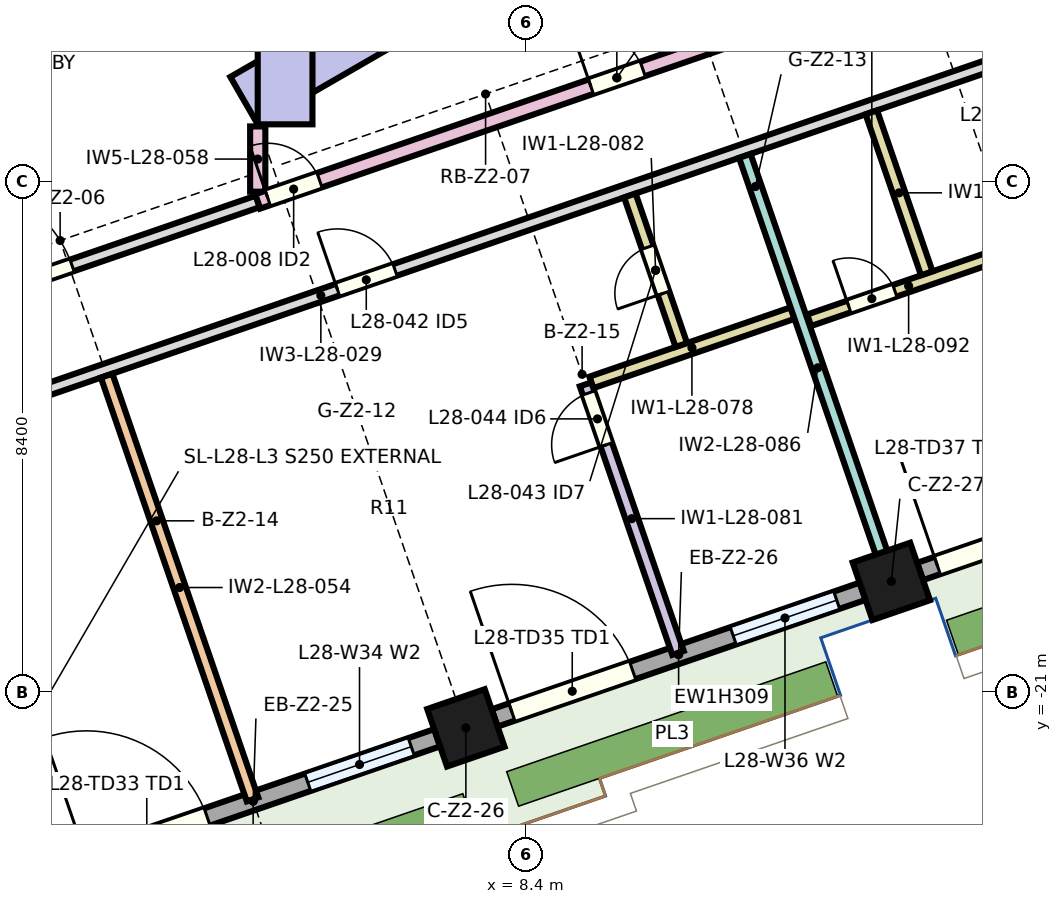
"""IFC4 building model, lengths in metres.
Left out: names, types, materials, properties, quantities, classifications, styles, units other than length and angle.
Written with IfcOpenShell. Run it as: python <this file> out.ifc"""

import sys

from ifc_helpers import new_model, si_unit, direction, frame, frame_2d, origin, origin_2d, place, context, subcontext, project, spatial, rectangle, extrude, element, fill, save


model = new_model("IFC4")
c1 = context("Model", 3, precision=1e-05, world=origin(), true_north=direction((0.0, 1.0)))
c2 = subcontext(c1, "Body", "Model", "MODEL_VIEW")
j1 = project(units=[si_unit("LENGTHUNIT", "METRE"), si_unit("PLANEANGLEUNIT", "RADIAN")], contexts=[c1])
p1 = place(None, origin())
s1 = spatial("IfcSite", under=j1, at=p1, CompositionType="ELEMENT")
p2 = place(p1, origin())
s2 = spatial("IfcBuilding", under=s1, at=p2, CompositionType="ELEMENT")
p3 = place(p2, frame((0.0, 0.0, 134.5)))
s3 = spatial("IfcBuildingStorey", under=s2, at=p3, CompositionType="ELEMENT", Elevation=134.5)
for number, where, z_axis, x_axis in (
    (1, (7.423, -21.558, 0.0), (0.0, 0.0, 1.0), (0.946, 0.326, 0.0)),
    (2, (14.42, -19.149, 0.0), (0.0, 0.0, 1.0), (0.946, 0.326, 0.0)),
):
    element("IfcColumn", number, at=place(p3, frame(where, z_axis=z_axis, x_axis=x_axis)), inside=s3, PredefinedType="COLUMN", context=c2, shape_type="SweptSolid", body=[
        extrude(rectangle(XDim=1.0, YDim=1.0, at=origin_2d()), origin(), (0.0, 0.0, 1.0), 3.55),
    ])
p4 = place(p3, frame((8.614, -8.449, 0.0), z_axis=(0.0, 0.0, 1.0), x_axis=(-0.866026961591, -0.49999730179, 0.0)))
e3 = element("IfcWall", 3, at=p4, inside=s3, PredefinedType="SHEAR", context=c2, shape_type="SweptSolid", body=[
    extrude(rectangle(XDim=5.587, YDim=0.9, at=frame_2d((2.794, 0.0))), origin(), (0.0, 0.0, 1.0), 3.8),
])
p5 = place(p3, frame((4.45, -11.633, 0.0), z_axis=(0.0, 0.0, 1.0), x_axis=(0.0, 1.0, 0.0)))
e4 = element("IfcWall", 4, at=p5, inside=s3, PredefinedType="SHEAR", context=c2, shape_type="SweptSolid", body=[
    extrude(rectangle(XDim=23.265, YDim=0.9, at=frame_2d((11.633, 0.0))), origin(), (0.0, 0.0, 1.0), 3.8),
])
p6 = place(p5, frame((7.558, 0.0, 0.0)))
e5 = element("IfcOpeningElement", 5, at=p6, cuts=e4, PredefinedType="OPENING", context=c2, shape_type="SweptSolid", body=[
    extrude(rectangle(XDim=1.1, YDim=2.1, at=frame_2d((0.55, 1.05))), frame((0.0, 0.46, 0.0), z_axis=(0.0, -1.0, 0.0), x_axis=(1.0, 0.0, 0.0)), (0.0, 0.0, 1.0), 0.92),
])
p7 = place(p5, frame((9.907, 0.0, 0.0)))
e6 = element("IfcOpeningElement", 6, at=p7, cuts=e4, PredefinedType="OPENING", context=c2, shape_type="SweptSolid", body=[
    extrude(rectangle(XDim=1.1, YDim=2.1, at=frame_2d((0.55, 1.05))), frame((0.0, 0.46, 0.0), z_axis=(0.0, -1.0, 0.0), x_axis=(1.0, 0.0, 0.0)), (0.0, 0.0, 1.0), 0.92),
])
p8 = place(p5, frame((12.258, 0.0, 0.0)))
e7 = element("IfcOpeningElement", 7, at=p8, cuts=e4, PredefinedType="OPENING", context=c2, shape_type="SweptSolid", body=[
    extrude(rectangle(XDim=1.1, YDim=2.1, at=frame_2d((0.55, 1.05))), frame((0.0, 0.46, 0.0), z_axis=(0.0, -1.0, 0.0), x_axis=(1.0, 0.0, 0.0)), (0.0, 0.0, 1.0), 0.92),
])
p9 = place(p5, frame((14.607, 0.0, 0.0)))
e8 = element("IfcOpeningElement", 8, at=p9, cuts=e4, PredefinedType="OPENING", context=c2, shape_type="SweptSolid", body=[
    extrude(rectangle(XDim=1.1, YDim=2.1, at=frame_2d((0.55, 1.05))), frame((0.0, 0.46, 0.0), z_axis=(0.0, -1.0, 0.0), x_axis=(1.0, 0.0, 0.0)), (0.0, 0.0, 1.0), 0.92),
])
p10 = place(p5, frame((5.208, 0.0, 0.0)))
e9 = element("IfcOpeningElement", 9, at=p10, cuts=e4, PredefinedType="OPENING", context=c2, shape_type="SweptSolid", body=[
    extrude(rectangle(XDim=1.1, YDim=2.1, at=frame_2d((0.55, 1.05))), frame((0.0, 0.46, 0.0), z_axis=(0.0, -1.0, 0.0), x_axis=(1.0, 0.0, 0.0)), (0.0, 0.0, 1.0), 0.92),
])
p11 = place(p5, frame((17.008, 0.0, 0.0)))
e10 = element("IfcOpeningElement", 10, at=p11, cuts=e4, PredefinedType="OPENING", context=c2, shape_type="SweptSolid", body=[
    extrude(rectangle(XDim=1.0, YDim=2.1, at=frame_2d((0.5, 1.05))), frame((0.0, 0.46, 0.0), z_axis=(0.0, -1.0, 0.0), x_axis=(1.0, 0.0, 0.0)), (0.0, 0.0, 1.0), 0.92),
])
p12 = place(p3, frame((0.899, -23.804, 0.0), z_axis=(0.0, 0.0, 1.0), x_axis=(0.945524496524, 0.325550958337, 0.0)))
e11 = element("IfcWall", 11, at=p12, inside=s3, PredefinedType="SOLIDWALL", context=c2, shape_type="SweptSolid", body=[
    extrude(rectangle(XDim=6.4, YDim=0.3, at=frame_2d((3.2, 0.0))), origin(), (0.0, 0.0, 1.0), 3.09),
])
p13 = place(p12, frame((0.3, 0.0, 0.0)))
e12 = element("IfcOpeningElement", 12, at=p13, cuts=e11, PredefinedType="OPENING", context=c2, shape_type="SweptSolid", body=[
    extrude(rectangle(XDim=2.1, YDim=2.4, at=frame_2d((1.05, 1.2))), frame((0.0, 0.16, 0.0), z_axis=(0.0, -1.0, 0.0), x_axis=(1.0, 0.0, 0.0)), (0.0, 0.0, 1.0), 0.32),
])
p14 = place(p12, frame((4.15, 0.0, 0.9)))
e13 = element("IfcOpeningElement", 13, at=p14, cuts=e11, PredefinedType="OPENING", context=c2, shape_type="SweptSolid", body=[
    extrude(rectangle(XDim=1.8, YDim=1.5, at=frame_2d((0.9, 0.75))), frame((0.0, 0.16, 0.0), z_axis=(0.0, -1.0, 0.0), x_axis=(1.0, 0.0, 0.0)), (0.0, 0.0, 1.0), 0.32),
])
p15 = place(p3, frame((7.896, -21.395, 0.0), z_axis=(0.0, 0.0, 1.0), x_axis=(0.945524496524, 0.325550958337, 0.0)))
e14 = element("IfcWall", 14, at=p15, inside=s3, PredefinedType="SOLIDWALL", context=c2, shape_type="SweptSolid", body=[
    extrude(rectangle(XDim=6.4, YDim=0.3, at=frame_2d((3.2, 0.0))), origin(), (0.0, 0.0, 1.0), 3.09),
])
p16 = place(p15, frame((0.3, 0.0, 0.0)))
e15 = element("IfcOpeningElement", 15, at=p16, cuts=e14, PredefinedType="OPENING", context=c2, shape_type="SweptSolid", body=[
    extrude(rectangle(XDim=2.1, YDim=2.4, at=frame_2d((1.05, 1.2))), frame((0.0, 0.16, 0.0), z_axis=(0.0, -1.0, 0.0), x_axis=(1.0, 0.0, 0.0)), (0.0, 0.0, 1.0), 0.32),
])
p17 = place(p15, frame((4.15, 0.0, 0.9)))
e16 = element("IfcOpeningElement", 16, at=p17, cuts=e14, PredefinedType="OPENING", context=c2, shape_type="SweptSolid", body=[
    extrude(rectangle(XDim=1.8, YDim=1.5, at=frame_2d((0.9, 0.75))), frame((0.0, 0.16, 0.0), z_axis=(0.0, -1.0, 0.0), x_axis=(1.0, 0.0, 0.0)), (0.0, 0.0, 1.0), 0.32),
])
p18 = place(p3, frame((14.893, -18.986, 0.0), z_axis=(0.0, 0.0, 1.0), x_axis=(0.945512753621, 0.325585062219, 0.0)))
e17 = element("IfcWall", 17, at=p18, inside=s3, PredefinedType="SOLIDWALL", context=c2, shape_type="SweptSolid", body=[
    extrude(rectangle(XDim=6.4, YDim=0.3, at=frame_2d((3.2, 0.0))), origin(), (0.0, 0.0, 1.0), 3.09),
])
p19 = place(p18, frame((0.3, 0.0, 0.0)))
e18 = element("IfcOpeningElement", 18, at=p19, cuts=e17, PredefinedType="OPENING", context=c2, shape_type="SweptSolid", body=[
    extrude(rectangle(XDim=2.1, YDim=2.4, at=frame_2d((1.05, 1.2))), frame((0.0, 0.16, 0.0), z_axis=(0.0, -1.0, 0.0), x_axis=(1.0, 0.0, 0.0)), (0.0, 0.0, 1.0), 0.32),
])
p20 = place(p18, frame((4.15, 0.0, 0.9)))
e19 = element("IfcOpeningElement", 19, at=p20, cuts=e17, PredefinedType="OPENING", context=c2, shape_type="SweptSolid", body=[
    extrude(rectangle(XDim=1.8, YDim=1.5, at=frame_2d((0.9, 0.75))), frame((0.0, 0.16, 0.0), z_axis=(0.0, -1.0, 0.0), x_axis=(1.0, 0.0, 0.0)), (0.0, 0.0, 1.0), 0.32),
])
p21 = place(p3, frame((-12.586, -20.515, 0.0), z_axis=(0.0, 0.0, 1.0), x_axis=(0.945519939336, 0.325564193852, 0.0)))
e20 = element("IfcWall", 20, at=p21, inside=s3, PredefinedType="PARTITIONING", context=c2, shape_type="SweptSolid", body=[
    extrude(rectangle(XDim=37.28, YDim=0.2, at=frame_2d((18.64, 0.0))), origin(), (0.0, 0.0, 1.0), 3.55),
])
p22 = place(p21, frame((9.83, 0.0, 0.0)))
e21 = element("IfcOpeningElement", 21, at=p22, cuts=e20, PredefinedType="OPENING", context=c2, shape_type="SweptSolid", body=[
    extrude(rectangle(XDim=1.0, YDim=2.1, at=frame_2d((0.5, 1.05))), frame((0.0, 0.11, 0.0), z_axis=(0.0, -1.0, 0.0), x_axis=(1.0, 0.0, 0.0)), (0.0, 0.0, 1.0), 0.22),
])
p23 = place(p21, frame((18.93, 0.0, 0.0)))
e22 = element("IfcOpeningElement", 22, at=p23, cuts=e20, PredefinedType="OPENING", context=c2, shape_type="SweptSolid", body=[
    extrude(rectangle(XDim=1.0, YDim=2.1, at=frame_2d((0.5, 1.05))), frame((0.0, 0.11, 0.0), z_axis=(0.0, -1.0, 0.0), x_axis=(1.0, 0.0, 0.0)), (0.0, 0.0, 1.0), 0.22),
])
p24 = place(p21, frame((30.28, 0.0, 0.0)))
e23 = element("IfcOpeningElement", 23, at=p24, cuts=e20, PredefinedType="OPENING", context=c2, shape_type="SweptSolid", body=[
    extrude(rectangle(XDim=1.0, YDim=2.1, at=frame_2d((0.5, 1.05))), frame((0.0, 0.11, 0.0), z_axis=(0.0, -1.0, 0.0), x_axis=(1.0, 0.0, 0.0)), (0.0, 0.0, 1.0), 0.22),
])
p25 = place(p21, frame((0.13, 0.0, 0.0)))
e24 = element("IfcOpeningElement", 24, at=p25, cuts=e20, PredefinedType="OPENING", context=c2, shape_type="SweptSolid", body=[
    extrude(rectangle(XDim=1.0, YDim=2.1, at=frame_2d((0.5, 1.05))), frame((0.0, 0.11, 0.0), z_axis=(0.0, -1.0, 0.0), x_axis=(1.0, 0.0, 0.0)), (0.0, 0.0, 1.0), 0.22),
])
p26 = place(p21, frame((34.23, 0.0, 0.0)))
e25 = element("IfcOpeningElement", 25, at=p26, cuts=e20, PredefinedType="OPENING", context=c2, shape_type="SweptSolid", body=[
    extrude(rectangle(XDim=1.1, YDim=2.1, at=frame_2d((0.55, 1.05))), frame((0.0, 0.11, 0.0), z_axis=(0.0, -1.0, 0.0), x_axis=(1.0, 0.0, 0.0)), (0.0, 0.0, 1.0), 0.22),
])
p27 = place(p3, frame((-11.49, -18.234, 0.0), z_axis=(0.0, 0.0, 1.0), x_axis=(0.945522545762, 0.325556624039, 0.0)))
e26 = element("IfcWall", 26, at=p27, inside=s3, PredefinedType="PARTITIONING", context=c2, shape_type="SweptSolid", body=[
    extrude(rectangle(XDim=16.382, YDim=0.2, at=frame_2d((8.191, 0.0))), origin(), (0.0, 0.0, 1.0), 3.55),
])
p28 = place(p27, frame((6.851, 0.0, 0.0)))
e27 = element("IfcOpeningElement", 27, at=p28, cuts=e26, PredefinedType="OPENING", context=c2, shape_type="SweptSolid", body=[
    extrude(rectangle(XDim=0.9, YDim=2.1, at=frame_2d((0.45, 1.05))), frame((0.0, 0.11, 0.0), z_axis=(0.0, -1.0, 0.0), x_axis=(1.0, 0.0, 0.0)), (0.0, 0.0, 1.0), 0.22),
])
p29 = place(p27, frame((11.152, 0.0, 0.0)))
e28 = element("IfcOpeningElement", 28, at=p29, cuts=e26, PredefinedType="OPENING", context=c2, shape_type="SweptSolid", body=[
    extrude(rectangle(XDim=2.0, YDim=2.1, at=frame_2d((1.0, 1.05))), frame((0.0, 0.11, 0.0), z_axis=(0.0, -1.0, 0.0), x_axis=(1.0, 0.0, 0.0)), (0.0, 0.0, 1.0), 0.22),
])
p30 = place(p3, frame((1.515, -15.766, 0.0), z_axis=(0.0, 0.0, 1.0), x_axis=(0.325563917555, -0.945520034471, 0.0)))
e29 = element("IfcWall", 29, at=p30, inside=s3, PredefinedType="PARTITIONING", context=c2, shape_type="SweptSolid", body=[
    extrude(rectangle(XDim=7.37, YDim=0.2, at=frame_2d((3.685, 0.0))), origin(), (0.0, 0.0, 1.0), 3.05),
])
p31 = place(p3, frame((4.0, -12.74, 0.0), z_axis=(0.0, 0.0, 1.0), x_axis=(0.0, 1.0, 0.0)))
e30 = element("IfcWall", 30, at=p31, inside=s3, PredefinedType="SOLIDWALL", context=c2, shape_type="SweptSolid", body=[
    extrude(rectangle(XDim=1.073, YDim=0.25, at=frame_2d((0.537, 0.0))), origin(), (0.0, 0.0, 1.0), 3.55),
])
p32 = place(p3, frame((4.0, -12.901, 0.0), z_axis=(0.0, 0.0, 1.0), x_axis=(0.945515789626, 0.325576245398, 0.0)))
e31 = element("IfcWall", 31, at=p32, inside=s3, PredefinedType="SOLIDWALL", context=c2, shape_type="SweptSolid", body=[
    extrude(rectangle(XDim=12.491, YDim=0.25, at=frame_2d((6.246, 0.0))), origin(), (0.0, 0.0, 1.0), 3.55),
])
p33 = place(p32, frame((0.175, 0.0, 0.0)))
e32 = element("IfcOpeningElement", 32, at=p33, cuts=e31, PredefinedType="OPENING", context=c2, shape_type="SweptSolid", body=[
    extrude(rectangle(XDim=0.9, YDim=2.1, at=frame_2d((0.45, 1.05))), frame((0.0, 0.135, 0.0), z_axis=(0.0, -1.0, 0.0), x_axis=(1.0, 0.0, 0.0)), (0.0, 0.0, 1.0), 0.27),
])
p34 = place(p32, frame((5.796, 0.0, 0.0)))
e33 = element("IfcOpeningElement", 33, at=p34, cuts=e31, PredefinedType="OPENING", context=c2, shape_type="SweptSolid", body=[
    extrude(rectangle(XDim=0.9, YDim=2.1, at=frame_2d((0.45, 1.05))), frame((0.0, 0.135, 0.0), z_axis=(0.0, -1.0, 0.0), x_axis=(1.0, 0.0, 0.0)), (0.0, 0.0, 1.0), 0.27),
])
p35 = place(p3, frame((9.486, -15.877, 0.0), z_axis=(0.0, 0.0, 1.0), x_axis=(0.945526322632, 0.325545654572, 0.0)))
e34 = element("IfcWall", 34, at=p35, inside=s3, PredefinedType="PARTITIONING", context=c2, shape_type="SweptSolid", body=[
    extrude(rectangle(XDim=3.5, YDim=0.2, at=frame_2d((1.75, 0.0))), origin(), (0.0, 0.0, 1.0), 3.55),
])
p36 = place(p3, frame((10.912, -20.325, 0.0), z_axis=(0.0, 0.0, 1.0), x_axis=(-0.325574999189, 0.945516218742, 0.0)))
e35 = element("IfcWall", 35, at=p36, inside=s3, PredefinedType="PARTITIONING", context=c2, shape_type="SweptSolid", body=[
    extrude(rectangle(XDim=4.67, YDim=0.2, at=frame_2d((2.335, 0.0))), origin(), (0.0, 0.0, 1.0), 3.05),
])
p37 = place(p36, frame((3.62, 0.0, 0.0)))
e36 = element("IfcOpeningElement", 36, at=p37, cuts=e35, PredefinedType="OPENING", context=c2, shape_type="SweptSolid", body=[
    extrude(rectangle(XDim=0.9, YDim=2.1, at=frame_2d((0.45, 1.05))), frame((0.0, 0.11, 0.0), z_axis=(0.0, -1.0, 0.0), x_axis=(1.0, 0.0, 0.0)), (0.0, 0.0, 1.0), 0.22),
])
p38 = place(p3, frame((10.966, -15.261, 0.0), z_axis=(0.0, 0.0, 1.0), x_axis=(-0.325649185186, 0.945490670598, 0.0)))
e37 = element("IfcWall", 37, at=p38, inside=s3, PredefinedType="PARTITIONING", context=c2, shape_type="SweptSolid", body=[
    extrude(rectangle(XDim=2.6, YDim=0.2, at=frame_2d((1.3, 0.0))), origin(), (0.0, 0.0, 1.0), 3.55),
])
p39 = place(p38, frame((0.9, 0.0, 0.0)))
e38 = element("IfcOpeningElement", 38, at=p39, cuts=e37, PredefinedType="OPENING", context=c2, shape_type="SweptSolid", body=[
    extrude(rectangle(XDim=0.8, YDim=2.1, at=frame_2d((0.4, 1.05))), frame((0.0, 0.11, 0.0), z_axis=(0.0, -1.0, 0.0), x_axis=(1.0, 0.0, 0.0)), (0.0, 0.0, 1.0), 0.22),
])
p40 = place(p3, frame((12.01, -12.152, 0.0), z_axis=(0.0, 0.0, 1.0), x_axis=(0.325563917555, -0.945520034471, 0.0)))
e39 = element("IfcWall", 39, at=p40, inside=s3, PredefinedType="PARTITIONING", context=c2, shape_type="SweptSolid", body=[
    extrude(rectangle(XDim=7.37, YDim=0.2, at=frame_2d((3.685, 0.0))), origin(), (0.0, 0.0, 1.0), 2.65),
])
p41 = place(p3, frame((13.068, -14.855, 0.0), z_axis=(0.0, 0.0, 1.0), x_axis=(0.945518358783, 0.325568784136, 0.0)))
e40 = element("IfcWall", 40, at=p41, inside=s3, PredefinedType="PARTITIONING", context=c2, shape_type="SweptSolid", body=[
    extrude(rectangle(XDim=3.46, YDim=0.2, at=frame_2d((1.73, 0.0))), origin(), (0.0, 0.0, 1.0), 3.55),
])
p42 = place(p41, frame((0.69, 0.0, 0.0)))
e41 = element("IfcOpeningElement", 41, at=p42, cuts=e40, PredefinedType="OPENING", context=c2, shape_type="SweptSolid", body=[
    extrude(rectangle(XDim=0.8, YDim=2.1, at=frame_2d((0.4, 1.05))), frame((0.0, 0.11, 0.0), z_axis=(0.0, -1.0, 0.0), x_axis=(1.0, 0.0, 0.0)), (0.0, 0.0, 1.0), 0.22),
])
p43 = place(p3, frame((14.091, -11.436, 0.0), z_axis=(0.0, 0.0, 1.0), x_axis=(0.325498881735, -0.945542425272, 0.0)))
e42 = element("IfcWall", 42, at=p43, inside=s3, PredefinedType="PARTITIONING", context=c2, shape_type="SweptSolid", body=[
    extrude(rectangle(XDim=2.8, YDim=0.2, at=frame_2d((1.4, 0.0))), origin(), (0.0, 0.0, 1.0), 3.55),
])
p44 = place(p13, origin())
e43 = element("IfcDoor", 43, at=p44, inside=s3, OperationType="SLIDING_TO_LEFT", PredefinedType="DOOR", context=c2, shape_type="SweptSolid", body=[
    extrude(rectangle(XDim=2.1, YDim=2.4, at=frame_2d((1.05, 1.2))), frame((0.0, 0.025, 0.0), z_axis=(0.0, -1.0, 0.0), x_axis=(1.0, 0.0, 0.0)), (0.0, 0.0, 1.0), 0.05),
])
fill(e12, e43)
p45 = place(p14, origin())
e44 = element("IfcWindow", 44, at=p45, inside=s3, PartitioningType="SINGLE_PANEL", PredefinedType="WINDOW", context=c2, shape_type="SweptSolid", body=[
    extrude(rectangle(XDim=1.8, YDim=1.5, at=frame_2d((0.9, 0.75))), frame((0.0, 0.03, 0.0), z_axis=(0.0, -1.0, 0.0), x_axis=(1.0, 0.0, 0.0)), (0.0, 0.0, 1.0), 0.06),
])
fill(e13, e44)
p46 = place(p16, origin())
e45 = element("IfcDoor", 45, at=p46, inside=s3, OperationType="SLIDING_TO_LEFT", PredefinedType="DOOR", context=c2, shape_type="SweptSolid", body=[
    extrude(rectangle(XDim=2.1, YDim=2.4, at=frame_2d((1.05, 1.2))), frame((0.0, 0.025, 0.0), z_axis=(0.0, -1.0, 0.0), x_axis=(1.0, 0.0, 0.0)), (0.0, 0.0, 1.0), 0.05),
])
fill(e15, e45)
p47 = place(p17, origin())
e46 = element("IfcWindow", 46, at=p47, inside=s3, PartitioningType="SINGLE_PANEL", PredefinedType="WINDOW", context=c2, shape_type="SweptSolid", body=[
    extrude(rectangle(XDim=1.8, YDim=1.5, at=frame_2d((0.9, 0.75))), frame((0.0, 0.03, 0.0), z_axis=(0.0, -1.0, 0.0), x_axis=(1.0, 0.0, 0.0)), (0.0, 0.0, 1.0), 0.06),
])
fill(e16, e46)
p48 = place(p19, origin())
e47 = element("IfcDoor", 47, at=p48, inside=s3, OperationType="SLIDING_TO_LEFT", PredefinedType="DOOR", context=c2, shape_type="SweptSolid", body=[
    extrude(rectangle(XDim=2.1, YDim=2.4, at=frame_2d((1.05, 1.2))), frame((0.0, 0.025, 0.0), z_axis=(0.0, -1.0, 0.0), x_axis=(1.0, 0.0, 0.0)), (0.0, 0.0, 1.0), 0.05),
])
fill(e18, e47)
p49 = place(p33, origin())
e48 = element("IfcDoor", 48, at=p49, inside=s3, OperationType="NOTDEFINED", PredefinedType="DOOR", context=c2, shape_type="SweptSolid", body=[
    extrude(rectangle(XDim=0.9, YDim=2.1, at=frame_2d((0.45, 1.05))), frame((0.0, 0.025, 0.0), z_axis=(0.0, -1.0, 0.0), x_axis=(1.0, 0.0, 0.0)), (0.0, 0.0, 1.0), 0.05),
])
fill(e32, e48)
p50 = place(p29, origin())
e49 = element("IfcDoor", 49, at=p50, inside=s3, OperationType="NOTDEFINED", PredefinedType="DOOR", context=c2, shape_type="SweptSolid", body=[
    extrude(rectangle(XDim=2.0, YDim=2.1, at=frame_2d((1.0, 1.05))), frame((0.0, 0.025, 0.0), z_axis=(0.0, -1.0, 0.0), x_axis=(1.0, 0.0, 0.0)), (0.0, 0.0, 1.0), 0.05),
])
fill(e28, e49)
p51 = place(p23, origin())
e50 = element("IfcDoor", 50, at=p51, inside=s3, OperationType="NOTDEFINED", PredefinedType="DOOR", context=c2, shape_type="SweptSolid", body=[
    extrude(rectangle(XDim=1.0, YDim=2.1, at=frame_2d((0.5, 1.05))), frame((0.0, 0.025, 0.0), z_axis=(0.0, -1.0, 0.0), x_axis=(1.0, 0.0, 0.0)), (0.0, 0.0, 1.0), 0.05),
])
fill(e22, e50)
p52 = place(p39, origin())
e51 = element("IfcDoor", 51, at=p52, inside=s3, OperationType="NOTDEFINED", PredefinedType="DOOR", context=c2, shape_type="SweptSolid", body=[
    extrude(rectangle(XDim=0.8, YDim=2.1, at=frame_2d((0.4, 1.05))), frame((0.0, 0.025, 0.0), z_axis=(0.0, -1.0, 0.0), x_axis=(1.0, 0.0, 0.0)), (0.0, 0.0, 1.0), 0.05),
])
fill(e38, e51)
p53 = place(p37, origin())
e52 = element("IfcDoor", 52, at=p53, inside=s3, OperationType="NOTDEFINED", PredefinedType="DOOR", context=c2, shape_type="SweptSolid", body=[
    extrude(rectangle(XDim=0.9, YDim=2.1, at=frame_2d((0.45, 1.05))), frame((0.0, 0.025, 0.0), z_axis=(0.0, -1.0, 0.0), x_axis=(1.0, 0.0, 0.0)), (0.0, 0.0, 1.0), 0.05),
])
fill(e36, e52)
p54 = place(p42, origin())
e53 = element("IfcDoor", 53, at=p54, inside=s3, OperationType="NOTDEFINED", PredefinedType="DOOR", context=c2, shape_type="SweptSolid", body=[
    extrude(rectangle(XDim=0.8, YDim=2.1, at=frame_2d((0.4, 1.05))), frame((0.0, 0.025, 0.0), z_axis=(0.0, -1.0, 0.0), x_axis=(1.0, 0.0, 0.0)), (0.0, 0.0, 1.0), 0.05),
])
fill(e41, e53)
p55 = place(p34, origin())
e54 = element("IfcDoor", 54, at=p55, inside=s3, OperationType="NOTDEFINED", PredefinedType="DOOR", context=c2, shape_type="SweptSolid", body=[
    extrude(rectangle(XDim=0.9, YDim=2.1, at=frame_2d((0.45, 1.05))), frame((0.0, 0.025, 0.0), z_axis=(0.0, -1.0, 0.0), x_axis=(1.0, 0.0, 0.0)), (0.0, 0.0, 1.0), 0.05),
])
fill(e33, e54)
save(model, sys.argv[1])
